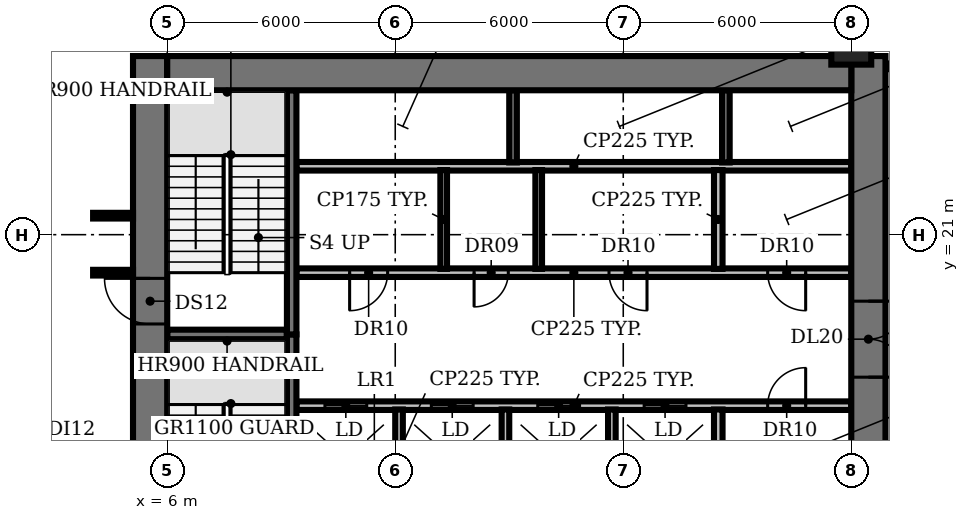
"""IFC4 building model, lengths in metres.
Left out: names, types, materials, properties, quantities, classifications, styles, units other than length and angle.
Written with IfcOpenShell. Run it as: python <this file> out.ifc"""

import sys

from ifc_helpers import new_model, si_unit, direction, frame, frame_2d, origin, origin_2d, place, context, subcontext, project, spatial, rectangle, circle, extrude, element, fill, save


model = new_model("IFC4")
c1 = context("Model", 3, precision=1e-05, world=origin(), true_north=direction((0.0, 1.0)))
c2 = subcontext(c1, "Body", "Model", "MODEL_VIEW")
j1 = project(units=[si_unit("LENGTHUNIT", "METRE"), si_unit("PLANEANGLEUNIT", "RADIAN")], contexts=[c1])
p1 = place(None, origin())
s1 = spatial("IfcSite", under=j1, at=p1, CompositionType="ELEMENT")
p2 = place(p1, origin())
s2 = spatial("IfcBuilding", under=s1, at=p2, CompositionType="ELEMENT")
p3 = place(p2, frame((0.0, 0.0, 50.0)))
s3 = spatial("IfcBuildingStorey", under=s2, at=p3, CompositionType="ELEMENT", Elevation=50.0)
p4 = place(p3, frame((24.0, 26.0, 0.0), z_axis=(0.0, 0.0, 1.0), x_axis=(1.0, 0.0, 0.0)))
e1 = element("IfcColumn", 1, at=p4, inside=s3, PredefinedType="COLUMN", context=c2, shape_type="SweptSolid", body=[
    extrude(circle(Radius=0.525, at=origin_2d()), origin(), (0.0, 0.0, 1.0), 3.85),
])
p5 = place(p3, frame((9.4, 16.5, 0.0), z_axis=(0.0, 0.0, 1.0), x_axis=(1.0, 0.0, 0.0)))
e2 = element("IfcWall", 2, at=p5, inside=s3, PredefinedType="PARTITIONING", context=c2, shape_type="SweptSolid", body=[
    extrude(rectangle(XDim=14.6, YDim=0.225, at=frame_2d((7.3, 0.0))), origin(), (0.0, 0.0, 1.0), 3.85),
])
p6 = place(p5, frame((0.75, 0.0, 0.0)))
e3 = element("IfcOpeningElement", 3, at=p6, cuts=e2, PredefinedType="OPENING", context=c2, shape_type="SweptSolid", body=[
    extrude(rectangle(XDim=1.1, YDim=2.1, at=frame_2d((0.55, 1.05))), frame((0.0, 0.123, 0.0), z_axis=(0.0, -1.0, 0.0), x_axis=(1.0, 0.0, 0.0)), (0.0, 0.0, 1.0), 0.245),
])
p7 = place(p5, frame((3.55, 0.0, 0.0)))
e4 = element("IfcOpeningElement", 4, at=p7, cuts=e2, PredefinedType="OPENING", context=c2, shape_type="SweptSolid", body=[
    extrude(rectangle(XDim=1.1, YDim=2.1, at=frame_2d((0.55, 1.05))), frame((0.0, 0.123, 0.0), z_axis=(0.0, -1.0, 0.0), x_axis=(1.0, 0.0, 0.0)), (0.0, 0.0, 1.0), 0.245),
])
p8 = place(p5, frame((6.35, 0.0, 0.0)))
e5 = element("IfcOpeningElement", 5, at=p8, cuts=e2, PredefinedType="OPENING", context=c2, shape_type="SweptSolid", body=[
    extrude(rectangle(XDim=1.1, YDim=2.1, at=frame_2d((0.55, 1.05))), frame((0.0, 0.123, 0.0), z_axis=(0.0, -1.0, 0.0), x_axis=(1.0, 0.0, 0.0)), (0.0, 0.0, 1.0), 0.245),
])
p9 = place(p5, frame((9.15, 0.0, 0.0)))
e6 = element("IfcOpeningElement", 6, at=p9, cuts=e2, PredefinedType="OPENING", context=c2, shape_type="SweptSolid", body=[
    extrude(rectangle(XDim=1.1, YDim=2.1, at=frame_2d((0.55, 1.05))), frame((0.0, 0.123, 0.0), z_axis=(0.0, -1.0, 0.0), x_axis=(1.0, 0.0, 0.0)), (0.0, 0.0, 1.0), 0.245),
])
p10 = place(p5, frame((12.4, 0.0, 0.0)))
e7 = element("IfcOpeningElement", 7, at=p10, cuts=e2, PredefinedType="OPENING", context=c2, shape_type="SweptSolid", body=[
    extrude(rectangle(XDim=1.0, YDim=2.1, at=frame_2d((0.5, 1.05))), frame((0.0, 0.123, 0.0), z_axis=(0.0, -1.0, 0.0), x_axis=(1.0, 0.0, 0.0)), (0.0, 0.0, 1.0), 0.245),
])
p11 = place(p3, frame((6.0, 18.375, 0.0), z_axis=(0.0, 0.0, 1.0), x_axis=(1.0, 0.0, 0.0)))
e8 = element("IfcWall", 8, at=p11, inside=s3, PredefinedType="SHEAR", context=c2, shape_type="SweptSolid", body=[
    extrude(rectangle(XDim=3.15, YDim=0.25, at=frame_2d((1.575, 0.0))), origin(), (0.0, 0.0, 1.0), 3.85),
])
p12 = place(p3, frame((24.0, 20.0, 0.0), z_axis=(0.0, 0.0, 1.0), x_axis=(-1.0, 0.0, 0.0)))
e9 = element("IfcWall", 9, at=p12, inside=s3, PredefinedType="PARTITIONING", context=c2, shape_type="SweptSolid", body=[
    extrude(rectangle(XDim=14.6, YDim=0.225, at=frame_2d((7.3, 0.0))), origin(), (0.0, 0.0, 1.0), 3.85),
])
p13 = place(p12, frame((12.2, 0.0, 0.0)))
e10 = element("IfcOpeningElement", 10, at=p13, cuts=e9, PredefinedType="OPENING", context=c2, shape_type="SweptSolid", body=[
    extrude(rectangle(XDim=1.0, YDim=2.1, at=frame_2d((0.5, 1.05))), frame((0.0, 0.123, 0.0), z_axis=(0.0, -1.0, 0.0), x_axis=(1.0, 0.0, 0.0)), (0.0, 0.0, 1.0), 0.245),
])
p14 = place(p12, frame((9.025, 0.0, 0.0)))
e11 = element("IfcOpeningElement", 11, at=p14, cuts=e9, PredefinedType="OPENING", context=c2, shape_type="SweptSolid", body=[
    extrude(rectangle(XDim=0.9, YDim=2.1, at=frame_2d((0.45, 1.05))), frame((0.0, 0.123, 0.0), z_axis=(0.0, -1.0, 0.0), x_axis=(1.0, 0.0, 0.0)), (0.0, 0.0, 1.0), 0.245),
])
p15 = place(p12, frame((5.375, 0.0, 0.0)))
e12 = element("IfcOpeningElement", 12, at=p15, cuts=e9, PredefinedType="OPENING", context=c2, shape_type="SweptSolid", body=[
    extrude(rectangle(XDim=1.0, YDim=2.1, at=frame_2d((0.5, 1.05))), frame((0.0, 0.123, 0.0), z_axis=(0.0, -1.0, 0.0), x_axis=(1.0, 0.0, 0.0)), (0.0, 0.0, 1.0), 0.245),
])
p16 = place(p12, frame((1.2, 0.0, 0.0)))
e13 = element("IfcOpeningElement", 13, at=p16, cuts=e9, PredefinedType="OPENING", context=c2, shape_type="SweptSolid", body=[
    extrude(rectangle(XDim=1.0, YDim=2.1, at=frame_2d((0.5, 1.05))), frame((0.0, 0.123, 0.0), z_axis=(0.0, -1.0, 0.0), x_axis=(1.0, 0.0, 0.0)), (0.0, 0.0, 1.0), 0.245),
])
p17 = place(p3, frame((9.4, 22.8, 0.0), z_axis=(0.0, 0.0, 1.0), x_axis=(1.0, 0.0, 0.0)))
e14 = element("IfcWall", 14, at=p17, inside=s3, PredefinedType="PARTITIONING", context=c2, shape_type="SweptSolid", body=[
    extrude(rectangle(XDim=14.6, YDim=0.225, at=frame_2d((7.3, 0.0))), origin(), (0.0, 0.0, 1.0), 3.85),
])
p18 = place(p3, frame((9.275, 18.375, 0.0), z_axis=(0.0, 0.0, 1.0), x_axis=(0.0, -1.0, 0.0)))
e15 = element("IfcWall", 15, at=p18, inside=s3, PredefinedType="SHEAR", context=c2, shape_type="SweptSolid", body=[
    extrude(rectangle(XDim=6.55, YDim=0.25, at=frame_2d((3.275, 0.0))), origin(), (0.0, 0.0, 1.0), 3.85),
])
p19 = place(p18, frame((5.075, 0.0, 0.0)))
e16 = element("IfcOpeningElement", 16, at=p19, cuts=e15, PredefinedType="OPENING", context=c2, shape_type="SweptSolid", body=[
    extrude(rectangle(XDim=1.0, YDim=2.1, at=frame_2d((0.5, 1.05))), frame((0.0, 0.135, 0.0), z_axis=(0.0, -1.0, 0.0), x_axis=(1.0, 0.0, 0.0)), (0.0, 0.0, 1.0), 0.27),
])
p20 = place(p3, frame((9.275, 18.375, 0.0), z_axis=(0.0, 0.0, 1.0), x_axis=(0.0, 1.0, 0.0)))
e17 = element("IfcWall", 17, at=p20, inside=s3, PredefinedType="SHEAR", context=c2, shape_type="SweptSolid", body=[
    extrude(rectangle(XDim=6.425, YDim=0.25, at=frame_2d((3.212, 0.0))), origin(), (0.0, 0.0, 1.0), 3.85),
])
p21 = place(p3, frame((12.1, 13.8, 0.0), z_axis=(0.0, 0.0, 1.0), x_axis=(0.0, 1.0, 0.0)))
e18 = element("IfcWall", 18, at=p21, inside=s3, PredefinedType="SOLIDWALL", context=c2, shape_type="SweptSolid", body=[
    extrude(rectangle(XDim=2.6, YDim=0.2, at=frame_2d((1.3, 0.0))), origin(), (0.0, 0.0, 1.0), 3.85),
])
p22 = place(p3, frame((13.275, 20.1, 0.0), z_axis=(0.0, 0.0, 1.0), x_axis=(0.0, 1.0, 0.0)))
e19 = element("IfcWall", 19, at=p22, inside=s3, PredefinedType="PARTITIONING", context=c2, shape_type="SweptSolid", body=[
    extrude(rectangle(XDim=2.6, YDim=0.175, at=frame_2d((1.3, 0.0))), origin(), (0.0, 0.0, 1.0), 3.85),
])
p23 = place(p3, frame((14.9, 13.8, 0.0), z_axis=(0.0, 0.0, 1.0), x_axis=(0.0, 1.0, 0.0)))
e20 = element("IfcWall", 20, at=p23, inside=s3, PredefinedType="SOLIDWALL", context=c2, shape_type="SweptSolid", body=[
    extrude(rectangle(XDim=2.6, YDim=0.2, at=frame_2d((1.3, 0.0))), origin(), (0.0, 0.0, 1.0), 3.85),
])
p24 = place(p3, frame((15.1, 22.9, 0.0), z_axis=(0.0, 0.0, 1.0), x_axis=(0.0, 1.0, 0.0)))
e21 = element("IfcWall", 21, at=p24, inside=s3, PredefinedType="SHEAR", context=c2, shape_type="SweptSolid", body=[
    extrude(rectangle(XDim=1.9, YDim=0.2, at=frame_2d((0.95, 0.0))), origin(), (0.0, 0.0, 1.0), 3.85),
])
p25 = place(p3, frame((15.775, 20.1, 0.0), z_axis=(0.0, 0.0, 1.0), x_axis=(0.0, 1.0, 0.0)))
e22 = element("IfcWall", 22, at=p25, inside=s3, PredefinedType="PARTITIONING", context=c2, shape_type="SweptSolid", body=[
    extrude(rectangle(XDim=2.6, YDim=0.175, at=frame_2d((1.3, 0.0))), origin(), (0.0, 0.0, 1.0), 3.85),
])
p26 = place(p3, frame((17.7, 13.8, 0.0), z_axis=(0.0, 0.0, 1.0), x_axis=(0.0, 1.0, 0.0)))
e23 = element("IfcWall", 23, at=p26, inside=s3, PredefinedType="SOLIDWALL", context=c2, shape_type="SweptSolid", body=[
    extrude(rectangle(XDim=2.6, YDim=0.2, at=frame_2d((1.3, 0.0))), origin(), (0.0, 0.0, 1.0), 3.85),
])
for number, where, z_axis, x_axis in (
    (24, (20.5, 13.8, 0.0), (0.0, 0.0, 1.0), (0.0, 1.0, 0.0)),
    (25, (20.5, 20.1, 0.0), (0.0, 0.0, 1.0), (0.0, 1.0, 0.0)),
):
    element("IfcWall", number, at=place(p3, frame(where, z_axis=z_axis, x_axis=x_axis)), inside=s3, PredefinedType="PARTITIONING", context=c2, shape_type="SweptSolid", body=[
        extrude(rectangle(XDim=2.6, YDim=0.225, at=frame_2d((1.3, 0.0))), origin(), (0.0, 0.0, 1.0), 3.85),
    ])
p27 = place(p3, frame((20.7, 22.9, 0.0), z_axis=(0.0, 0.0, 1.0), x_axis=(0.0, 1.0, 0.0)))
e26 = element("IfcWall", 26, at=p27, inside=s3, PredefinedType="SHEAR", context=c2, shape_type="SweptSolid", body=[
    extrude(rectangle(XDim=1.9, YDim=0.2, at=frame_2d((0.95, 0.0))), origin(), (0.0, 0.0, 1.0), 3.85),
])
p28 = place(p3, frame((5.55, 4.5, 0.0), z_axis=(0.0, 0.0, 1.0), x_axis=(0.0, 1.0, 0.0)))
e27 = element("IfcWall", 27, at=p28, inside=s3, PredefinedType="SHEAR", context=c2, shape_type="SweptSolid", body=[
    extrude(rectangle(XDim=21.2, YDim=0.9, at=frame_2d((10.6, 0.0))), origin(), (0.0, 0.0, 1.0), 3.85),
])
p29 = place(p28, frame((1.15, 0.0, 0.0)))
e28 = element("IfcOpeningElement", 28, at=p29, cuts=e27, PredefinedType="OPENING", context=c2, shape_type="SweptSolid", body=[
    extrude(rectangle(XDim=1.5, YDim=2.1, at=frame_2d((0.75, 1.05))), frame((0.0, 0.46, 0.0), z_axis=(0.0, -1.0, 0.0), x_axis=(1.0, 0.0, 0.0)), (0.0, 0.0, 1.0), 0.92),
])
p30 = place(p28, frame((7.6, 0.0, 0.0)))
e29 = element("IfcOpeningElement", 29, at=p30, cuts=e27, PredefinedType="OPENING", context=c2, shape_type="SweptSolid", body=[
    extrude(rectangle(XDim=1.2, YDim=2.1, at=frame_2d((0.6, 1.05))), frame((0.0, 0.46, 0.0), z_axis=(0.0, -1.0, 0.0), x_axis=(1.0, 0.0, 0.0)), (0.0, 0.0, 1.0), 0.92),
])
p31 = place(p28, frame((14.15, 0.0, 0.0)))
e30 = element("IfcOpeningElement", 30, at=p31, cuts=e27, PredefinedType="OPENING", context=c2, shape_type="SweptSolid", body=[
    extrude(rectangle(XDim=1.2, YDim=2.1, at=frame_2d((0.6, 1.05))), frame((0.0, 0.46, 0.0), z_axis=(0.0, -1.0, 0.0), x_axis=(1.0, 0.0, 0.0)), (0.0, 0.0, 1.0), 0.92),
])
p32 = place(p3, frame((24.45, 25.7, 0.0), z_axis=(0.0, 0.0, 1.0), x_axis=(0.0, -1.0, 0.0)))
e31 = element("IfcWall", 31, at=p32, inside=s3, PredefinedType="SHEAR", context=c2, shape_type="SweptSolid", body=[
    extrude(rectangle(XDim=21.2, YDim=0.9, at=frame_2d((10.6, 0.0))), origin(), (0.0, 0.0, 1.0), 3.85),
])
p33 = place(p32, frame((18.55, 0.0, 0.0)))
e32 = element("IfcOpeningElement", 32, at=p33, cuts=e31, PredefinedType="OPENING", context=c2, shape_type="SweptSolid", body=[
    extrude(rectangle(XDim=1.5, YDim=2.1, at=frame_2d((0.75, 1.05))), frame((0.0, 0.46, 0.0), z_axis=(0.0, -1.0, 0.0), x_axis=(1.0, 0.0, 0.0)), (0.0, 0.0, 1.0), 0.92),
])
p34 = place(p32, frame((12.45, 0.0, 0.0)))
e33 = element("IfcOpeningElement", 33, at=p34, cuts=e31, PredefinedType="OPENING", context=c2, shape_type="SweptSolid", body=[
    extrude(rectangle(XDim=0.9, YDim=2.1, at=frame_2d((0.45, 1.05))), frame((0.0, 0.46, 0.0), z_axis=(0.0, -1.0, 0.0), x_axis=(1.0, 0.0, 0.0)), (0.0, 0.0, 1.0), 0.92),
])
p35 = place(p32, frame((6.45, 0.0, 0.0)))
e34 = element("IfcOpeningElement", 34, at=p35, cuts=e31, PredefinedType="OPENING", context=c2, shape_type="SweptSolid", body=[
    extrude(rectangle(XDim=2.0, YDim=2.1, at=frame_2d((1.0, 1.05))), frame((0.0, 0.46, 0.0), z_axis=(0.0, -1.0, 0.0), x_axis=(1.0, 0.0, 0.0)), (0.0, 0.0, 1.0), 0.92),
])
p36 = place(p3, frame((6.0, 25.25, 0.0), z_axis=(0.0, 0.0, 1.0), x_axis=(1.0, 0.0, 0.0)))
e35 = element("IfcWall", 35, at=p36, inside=s3, PredefinedType="SHEAR", context=c2, shape_type="SweptSolid", body=[
    extrude(rectangle(XDim=18.0, YDim=0.9, at=frame_2d((9.0, 0.0))), origin(), (0.0, 0.0, 1.0), 3.85),
])
for number, where, z_axis, x_axis in (
    (36, (4.05, 20.0, 0.0), (0.0, 0.0, 1.0), (1.0, 0.0, 0.0)),
    (37, (4.05, 21.5, 0.0), (0.0, 0.0, 1.0), (1.0, 0.0, 0.0)),
):
    element("IfcWall", number, at=place(p3, frame(where, z_axis=z_axis, x_axis=x_axis)), inside=s3, PredefinedType="PARTITIONING", context=c2, shape_type="SweptSolid", body=[
        extrude(rectangle(XDim=1.05, YDim=0.15, at=frame_2d((0.525, 0.0))), origin(), (0.0, 0.0, 1.0), 2.83),
    ])
p37 = place(p6, origin())
e38 = element("IfcDoor", 38, at=p37, inside=s3, OperationType="DOUBLE_DOOR_SLIDING", PredefinedType="DOOR", context=c2, shape_type="SweptSolid", body=[
    extrude(rectangle(XDim=1.1, YDim=2.1, at=frame_2d((0.55, 1.05))), frame((0.0, 0.025, 0.0), z_axis=(0.0, -1.0, 0.0), x_axis=(1.0, 0.0, 0.0)), (0.0, 0.0, 1.0), 0.05),
])
fill(e3, e38)
p38 = place(p7, origin())
e39 = element("IfcDoor", 39, at=p38, inside=s3, OperationType="DOUBLE_DOOR_SLIDING", PredefinedType="DOOR", context=c2, shape_type="SweptSolid", body=[
    extrude(rectangle(XDim=1.1, YDim=2.1, at=frame_2d((0.55, 1.05))), frame((0.0, 0.025, 0.0), z_axis=(0.0, -1.0, 0.0), x_axis=(1.0, 0.0, 0.0)), (0.0, 0.0, 1.0), 0.05),
])
fill(e4, e39)
p39 = place(p8, origin())
e40 = element("IfcDoor", 40, at=p39, inside=s3, OperationType="DOUBLE_DOOR_SLIDING", PredefinedType="DOOR", context=c2, shape_type="SweptSolid", body=[
    extrude(rectangle(XDim=1.1, YDim=2.1, at=frame_2d((0.55, 1.05))), frame((0.0, 0.025, 0.0), z_axis=(0.0, -1.0, 0.0), x_axis=(1.0, 0.0, 0.0)), (0.0, 0.0, 1.0), 0.05),
])
fill(e5, e40)
p40 = place(p9, origin())
e41 = element("IfcDoor", 41, at=p40, inside=s3, OperationType="DOUBLE_DOOR_SLIDING", PredefinedType="DOOR", context=c2, shape_type="SweptSolid", body=[
    extrude(rectangle(XDim=1.1, YDim=2.1, at=frame_2d((0.55, 1.05))), frame((0.0, 0.025, 0.0), z_axis=(0.0, -1.0, 0.0), x_axis=(1.0, 0.0, 0.0)), (0.0, 0.0, 1.0), 0.05),
])
fill(e6, e41)
p41 = place(p10, origin())
e42 = element("IfcDoor", 42, at=p41, inside=s3, OperationType="SINGLE_SWING_RIGHT", PredefinedType="DOOR", context=c2, shape_type="SweptSolid", body=[
    extrude(rectangle(XDim=1.0, YDim=2.1, at=frame_2d((0.5, 1.05))), frame((0.0, 0.025, 0.0), z_axis=(0.0, -1.0, 0.0), x_axis=(1.0, 0.0, 0.0)), (0.0, 0.0, 1.0), 0.05),
])
fill(e7, e42)
p42 = place(p13, origin())
e43 = element("IfcDoor", 43, at=p42, inside=s3, OperationType="SINGLE_SWING_RIGHT", PredefinedType="DOOR", context=c2, shape_type="SweptSolid", body=[
    extrude(rectangle(XDim=1.0, YDim=2.1, at=frame_2d((0.5, 1.05))), frame((0.0, 0.025, 0.0), z_axis=(0.0, -1.0, 0.0), x_axis=(1.0, 0.0, 0.0)), (0.0, 0.0, 1.0), 0.05),
])
fill(e10, e43)
p43 = place(p14, origin())
e44 = element("IfcDoor", 44, at=p43, inside=s3, OperationType="SINGLE_SWING_RIGHT", PredefinedType="DOOR", context=c2, shape_type="SweptSolid", body=[
    extrude(rectangle(XDim=0.9, YDim=2.1, at=frame_2d((0.45, 1.05))), frame((0.0, 0.025, 0.0), z_axis=(0.0, -1.0, 0.0), x_axis=(1.0, 0.0, 0.0)), (0.0, 0.0, 1.0), 0.05),
])
fill(e11, e44)
p44 = place(p15, origin())
e45 = element("IfcDoor", 45, at=p44, inside=s3, OperationType="SINGLE_SWING_LEFT", PredefinedType="DOOR", context=c2, shape_type="SweptSolid", body=[
    extrude(rectangle(XDim=1.0, YDim=2.1, at=frame_2d((0.5, 1.05))), frame((0.0, 0.025, 0.0), z_axis=(0.0, -1.0, 0.0), x_axis=(1.0, 0.0, 0.0)), (0.0, 0.0, 1.0), 0.05),
])
fill(e12, e45)
p45 = place(p16, origin())
e46 = element("IfcDoor", 46, at=p45, inside=s3, OperationType="SINGLE_SWING_LEFT", PredefinedType="DOOR", context=c2, shape_type="SweptSolid", body=[
    extrude(rectangle(XDim=1.0, YDim=2.1, at=frame_2d((0.5, 1.05))), frame((0.0, 0.025, 0.0), z_axis=(0.0, -1.0, 0.0), x_axis=(1.0, 0.0, 0.0)), (0.0, 0.0, 1.0), 0.05),
])
fill(e13, e46)
p46 = place(p31, origin())
e47 = element("IfcDoor", 47, at=p46, inside=s3, OperationType="SINGLE_SWING_RIGHT", PredefinedType="DOOR", context=c2, shape_type="SweptSolid", body=[
    extrude(rectangle(XDim=1.2, YDim=2.1, at=frame_2d((0.6, 1.05))), frame((0.0, 0.025, 0.0), z_axis=(0.0, -1.0, 0.0), x_axis=(1.0, 0.0, 0.0)), (0.0, 0.0, 1.0), 0.05),
])
fill(e30, e47)
p47 = place(p35, origin())
e48 = element("IfcDoor", 48, at=p47, inside=s3, OperationType="DOUBLE_DOOR_SINGLE_SWING", PredefinedType="DOOR", context=c2, shape_type="SweptSolid", body=[
    extrude(rectangle(XDim=2.0, YDim=2.1, at=frame_2d((1.0, 1.05))), frame((0.0, 0.025, 0.0), z_axis=(0.0, -1.0, 0.0), x_axis=(1.0, 0.0, 0.0)), (0.0, 0.0, 1.0), 0.05),
])
fill(e34, e48)
save(model, sys.argv[1])
